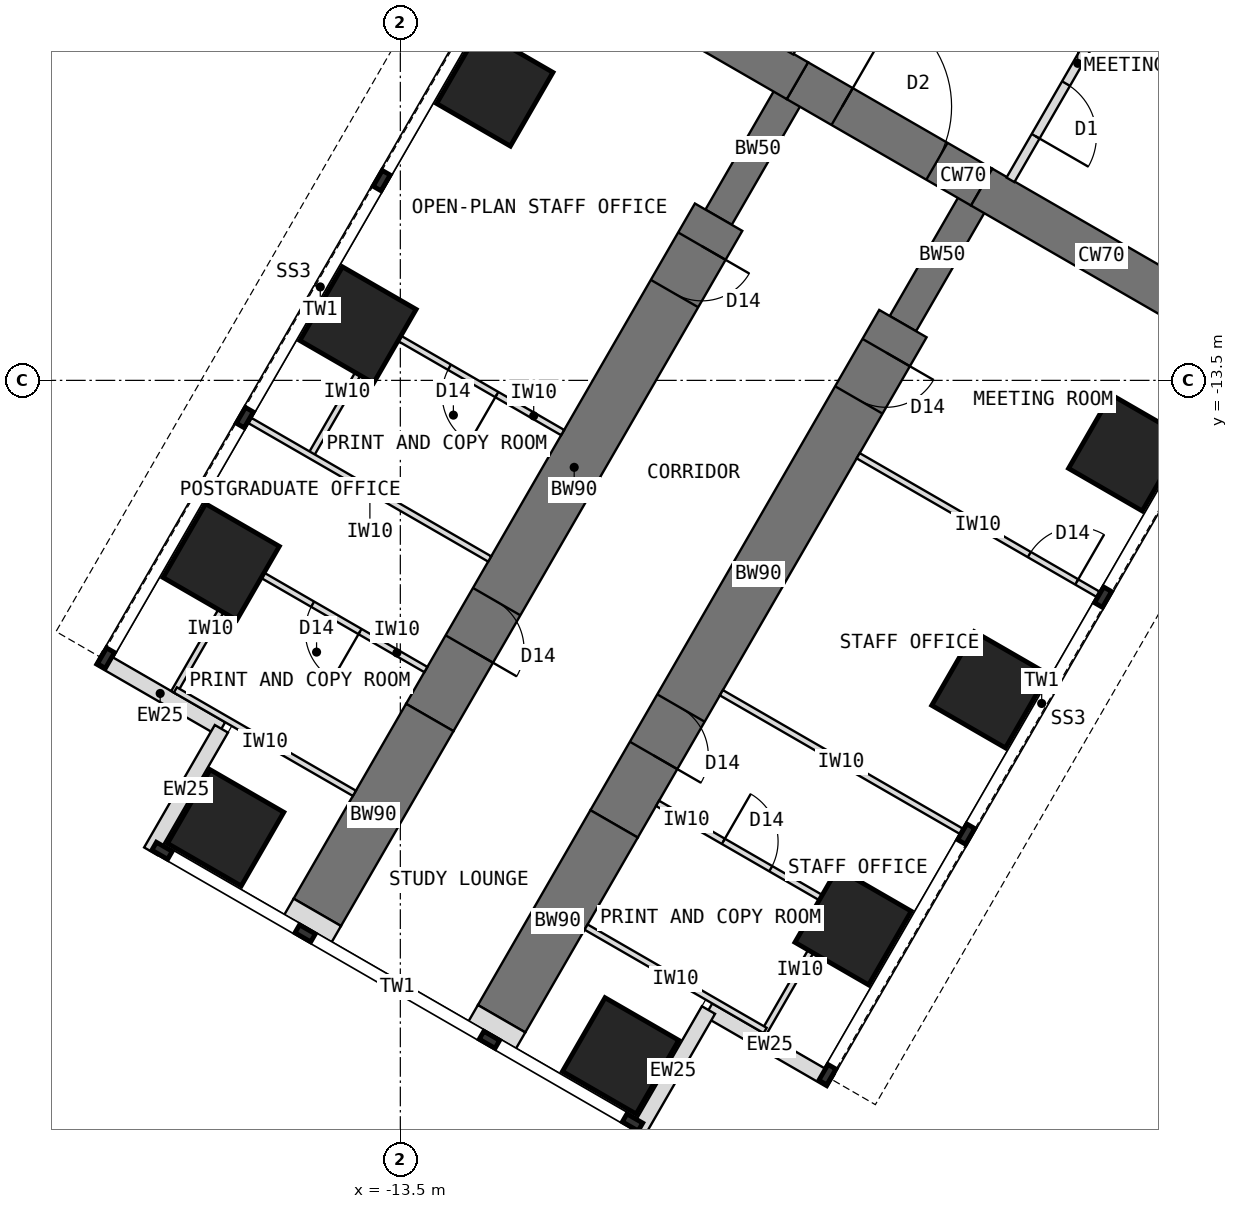
"""IFC4 building model, lengths in metres.
Left out: names, types, materials, properties, quantities, classifications, styles, units other than length and angle.
Written with IfcOpenShell. Run it as: python <this file> out.ifc"""

import sys

from ifc_helpers import new_model, si_unit, direction, frame, frame_2d, origin, origin_2d, place, context, subcontext, project, spatial, rectangle, extrude, element, fill, save


model = new_model("IFC4")
c1 = context("Model", 3, precision=1e-05, world=origin(), true_north=direction((0.0, 1.0)))
c2 = subcontext(c1, "Body", "Model", "MODEL_VIEW")
j1 = project(units=[si_unit("LENGTHUNIT", "METRE"), si_unit("PLANEANGLEUNIT", "RADIAN")], contexts=[c1])
p1 = place(None, origin())
s1 = spatial("IfcSite", under=j1, at=p1, CompositionType="ELEMENT")
p2 = place(p1, origin())
s2 = spatial("IfcBuilding", under=s1, at=p2, CompositionType="ELEMENT")
p3 = place(p2, frame((0.0, 0.0, 88.5)))
s3 = spatial("IfcBuildingStorey", under=s2, at=p3, CompositionType="ELEMENT", Elevation=88.5)
p4 = place(p3, frame((-10.908, -6.298, 0.0), z_axis=(0.0, 0.0, 1.0), x_axis=(0.866034513004, -0.499984222037, 0.0)))
e1 = element("IfcWall", 1, at=p4, inside=s3, PredefinedType="SHEAR", context=c2, shape_type="SweptSolid", body=[
    extrude(rectangle(XDim=4.548, YDim=0.7, at=frame_2d((2.274, 0.0))), origin(), (0.0, 0.0, 1.0), 4.0),
])
p5 = place(p3, frame((-6.97, -8.572, 0.0), z_axis=(0.0, 0.0, 1.0), x_axis=(0.866019471182, -0.500010275428, 0.0)))
e2 = element("IfcWall", 2, at=p5, inside=s3, PredefinedType="SHEAR", context=c2, shape_type="SweptSolid", body=[
    extrude(rectangle(XDim=3.5, YDim=0.7, at=frame_2d((1.75, 0.0))), origin(), (0.0, 0.0, 1.0), 4.0),
])
p6 = place(p5, frame((0.85, 0.0, 0.0)))
e3 = element("IfcOpeningElement", 3, at=p6, cuts=e2, PredefinedType="OPENING", context=c2, shape_type="SweptSolid", body=[
    extrude(rectangle(XDim=1.8, YDim=2.1, at=frame_2d((0.9, 1.05))), frame((0.0, 0.36, 0.0), z_axis=(0.0, -1.0, 0.0), x_axis=(1.0, 0.0, 0.0)), (0.0, 0.0, 1.0), 0.72),
])
p7 = place(p3, frame((-3.939, -10.322, 0.0), z_axis=(0.0, 0.0, 1.0), x_axis=(0.866011268655, -0.500024481964, 0.0)))
e4 = element("IfcWall", 4, at=p7, inside=s3, PredefinedType="SHEAR", context=c2, shape_type="SweptSolid", body=[
    extrude(rectangle(XDim=4.548, YDim=0.7, at=frame_2d((2.274, 0.0))), origin(), (0.0, 0.0, 1.0), 4.0),
])
p8 = place(p3, frame((-3.939, -10.322, 0.0), z_axis=(0.0, 0.0, 1.0), x_axis=(-0.499918158782, -0.866072649678, 0.0)))
e5 = element("IfcWall", 5, at=p8, inside=s3, PredefinedType="SHEAR", context=c2, shape_type="SweptSolid", body=[
    extrude(rectangle(XDim=2.592, YDim=0.5, at=frame_2d((1.296, 0.0))), origin(), (0.0, 0.0, 1.0), 4.0),
])
p9 = place(p3, frame((-5.234, -12.566, 0.0), z_axis=(0.0, 0.0, 1.0), x_axis=(-0.499997557548, -0.86602681393, 0.0)))
e6 = element("IfcWall", 6, at=p9, inside=s3, PredefinedType="SHEAR", context=c2, shape_type="SweptSolid", body=[
    extrude(rectangle(XDim=9.5, YDim=0.9, at=frame_2d((4.75, 0.0))), origin(), (0.0, 0.0, 1.0), 4.0),
])
p10 = place(p9, frame((0.55, 0.0, 0.0)))
e7 = element("IfcOpeningElement", 7, at=p10, cuts=e6, PredefinedType="OPENING", context=c2, shape_type="SweptSolid", body=[
    extrude(rectangle(XDim=0.9, YDim=2.1, at=frame_2d((0.45, 1.05))), frame((0.0, 0.46, 0.0), z_axis=(0.0, -1.0, 0.0), x_axis=(1.0, 0.0, 0.0)), (0.0, 0.0, 1.0), 0.92),
])
p11 = place(p9, frame((7.3, 0.0, 0.0)))
e8 = element("IfcOpeningElement", 8, at=p11, cuts=e6, PredefinedType="OPENING", context=c2, shape_type="SweptSolid", body=[
    extrude(rectangle(XDim=0.9, YDim=2.1, at=frame_2d((0.45, 1.05))), frame((0.0, 0.46, 0.0), z_axis=(0.0, -1.0, 0.0), x_axis=(1.0, 0.0, 0.0)), (0.0, 0.0, 1.0), 0.92),
])
p12 = place(p3, frame((-9.984, -20.794, 0.0), z_axis=(0.0, 0.0, 1.0), x_axis=(-0.500042316284, -0.866000971088, 0.0)))
e9 = element("IfcWall", 9, at=p12, inside=s3, PredefinedType="SHEAR", context=c2, shape_type="SweptSolid", body=[
    extrude(rectangle(XDim=3.7, YDim=0.9, at=frame_2d((1.85, 0.0))), origin(), (0.0, 0.0, 1.0), 4.0),
])
p13 = place(p3, frame((-6.97, -8.572, 0.0), z_axis=(0.0, 0.0, 1.0), x_axis=(-0.499988811324, -0.866031863473, 0.0)))
e10 = element("IfcWall", 10, at=p13, inside=s3, PredefinedType="SHEAR", context=c2, shape_type="SweptSolid", body=[
    extrude(rectangle(XDim=2.592, YDim=0.5, at=frame_2d((1.296, 0.0))), origin(), (0.0, 0.0, 1.0), 4.0),
])
p14 = place(p3, frame((-8.266, -10.816, 0.0), z_axis=(0.0, 0.0, 1.0), x_axis=(-0.499997557548, -0.86602681393, 0.0)))
e11 = element("IfcWall", 11, at=p14, inside=s3, PredefinedType="SHEAR", context=c2, shape_type="SweptSolid", body=[
    extrude(rectangle(XDim=9.5, YDim=0.9, at=frame_2d((4.75, 0.0))), origin(), (0.0, 0.0, 1.0), 4.0),
])
p15 = place(p14, frame((0.55, 0.0, 0.0)))
e12 = element("IfcOpeningElement", 12, at=p15, cuts=e11, PredefinedType="OPENING", context=c2, shape_type="SweptSolid", body=[
    extrude(rectangle(XDim=0.9, YDim=2.1, at=frame_2d((0.45, 1.05))), frame((0.0, 0.46, 0.0), z_axis=(0.0, -1.0, 0.0), x_axis=(1.0, 0.0, 0.0)), (0.0, 0.0, 1.0), 0.92),
])
p16 = place(p14, frame((7.3, 0.0, 0.0)))
e13 = element("IfcOpeningElement", 13, at=p16, cuts=e11, PredefinedType="OPENING", context=c2, shape_type="SweptSolid", body=[
    extrude(rectangle(XDim=0.9, YDim=2.1, at=frame_2d((0.45, 1.05))), frame((0.0, 0.46, 0.0), z_axis=(0.0, -1.0, 0.0), x_axis=(1.0, 0.0, 0.0)), (0.0, 0.0, 1.0), 0.92),
])
p17 = place(p3, frame((-13.016, -19.044, 0.0), z_axis=(0.0, 0.0, 1.0), x_axis=(-0.499992827086, -0.866029545028, 0.0)))
e14 = element("IfcWall", 14, at=p17, inside=s3, PredefinedType="SHEAR", context=c2, shape_type="SweptSolid", body=[
    extrude(rectangle(XDim=3.7, YDim=0.9, at=frame_2d((1.85, 0.0))), origin(), (0.0, 0.0, 1.0), 4.0),
])
for number, where, z_axis, x_axis in (
    (15, (-1.554, -14.691, 0.0), (0.0, 0.0, 1.0), (0.5, 0.866, 0.0)),
    (16, (-11.946, -8.691, 0.0), (0.0, 0.0, 1.0), (0.5, 0.866, 0.0)),
    (17, (-3.804, -18.588, 0.0), (0.0, 0.0, 1.0), (0.5, 0.866, 0.0)),
    (18, (-14.196, -12.588, 0.0), (0.0, 0.0, 1.0), (0.5, 0.866, 0.0)),
    (19, (-6.054, -22.486, 0.0), (0.0, 0.0, 1.0), (0.5, 0.866, 0.0)),
    (20, (-16.446, -16.486, 0.0), (0.0, 0.0, 1.0), (0.5, 0.866, 0.0)),
    (21, (-9.877, -24.608, 0.0), (0.0, 0.0, 1.0), (0.5, 0.866, 0.0)),
    (22, (-16.373, -20.858, 0.0), (0.0, 0.0, 1.0), (0.5, 0.866, 0.0)),
):
    element("IfcColumn", number, at=place(p3, frame(where, z_axis=z_axis, x_axis=x_axis)), inside=s3, PredefinedType="COLUMN", context=c2, shape_type="SweptSolid", body=[
        extrude(rectangle(XDim=1.4, YDim=1.4, at=origin_2d()), origin(), (0.0, 0.0, 1.0), 4.0),
    ])
for number, where, z_axis, x_axis in (
    (23, (-6.419, -25.017, 0.0), (0.0, 0.0, 1.0), (-0.866, 0.5, 0.0)),
    (24, (-8.432, -23.855, 0.0), (0.0, 0.0, 1.0), (-0.5, -0.866, 0.0)),
    (25, (-18.456, -18.067, 0.0), (0.0, 0.0, 1.0), (0.866, -0.5, 0.0)),
    (26, (-16.443, -19.23, 0.0), (0.0, 0.0, 1.0), (-0.5, -0.866, 0.0)),
):
    element("IfcWall", number, at=place(p3, frame(where, z_axis=z_axis, x_axis=x_axis)), inside=s3, PredefinedType="STANDARD", context=c2, shape_type="SweptSolid", body=[
        extrude(rectangle(XDim=2.325, YDim=0.25, at=frame_2d((1.163, 0.0))), origin(), (0.0, 0.0, 1.0), 3.7),
    ])
for number, where, z_axis, x_axis in (
    (27, (-11.834, -23.998, 0.0), (0.0, 0.0, 1.0), (-0.5, -0.866, 0.0)),
    (28, (-14.865, -22.248, 0.0), (0.0, 0.0, 1.0), (-0.5, -0.866, 0.0)),
):
    element("IfcWall", number, at=place(p3, frame(where, z_axis=z_axis, x_axis=x_axis)), inside=s3, PredefinedType="PARTITIONING", context=c2, shape_type="SweptSolid", body=[
        extrude(rectangle(XDim=0.31, YDim=0.9, at=frame_2d((0.155, 0.0))), origin(), (0.0, 0.0, 1.0), 3.7),
    ])
p18 = place(p3, frame((-1.201, -6.12, 0.0), z_axis=(0.0, 0.0, 1.0), x_axis=(0.500002627198, -0.866023886965, 0.0)))
e29 = element("IfcWall", 29, at=p18, inside=s3, PredefinedType="SHEAR", context=c2, shape_type="SweptSolid", body=[
    extrude(rectangle(XDim=5.858, YDim=0.4, at=frame_2d((2.929, 0.0))), origin(), (0.0, 0.0, 1.0), 4.0),
])
p19 = place(p3, frame((-5.97, -14.74, 0.0), z_axis=(0.0, 0.0, 1.0), x_axis=(0.866035472144, -0.499982560684, 0.0)))
e30 = element("IfcWall", 30, at=p19, inside=s3, PredefinedType="PARTITIONING", context=c2, shape_type="SweptSolid", body=[
    extrude(rectangle(XDim=4.55, YDim=0.1, at=frame_2d((2.275, 0.0))), origin(), (0.0, 0.0, 1.0), 3.7),
])
p20 = place(p19, frame((3.25, 0.0, 0.0)))
e31 = element("IfcOpeningElement", 31, at=p20, cuts=e30, PredefinedType="OPENING", context=c2, shape_type="SweptSolid", body=[
    extrude(rectangle(XDim=0.9, YDim=2.1, at=frame_2d((0.45, 1.05))), frame((0.0, 0.06, 0.0), z_axis=(0.0, -1.0, 0.0), x_axis=(1.0, 0.0, 0.0)), (0.0, 0.0, 1.0), 0.12),
])
p21 = place(p3, frame((-8.22, -18.637, 0.0), z_axis=(0.0, 0.0, 1.0), x_axis=(0.866012237902, -0.500022803284, 0.0)))
e32 = element("IfcWall", 32, at=p21, inside=s3, PredefinedType="PARTITIONING", context=c2, shape_type="SweptSolid", body=[
    extrude(rectangle(XDim=4.55, YDim=0.1, at=frame_2d((2.275, 0.0))), origin(), (0.0, 0.0, 1.0), 3.7),
])
p22 = place(p3, frame((-6.325, -22.156, 0.0), z_axis=(0.0, 0.0, 1.0), x_axis=(-0.500001309137, -0.866024647952, 0.0)))
e33 = element("IfcWall", 33, at=p22, inside=s3, PredefinedType="PARTITIONING", context=c2, shape_type="SweptSolid", body=[
    extrude(rectangle(XDim=2.4, YDim=0.1, at=frame_2d((1.2, 0.0))), origin(), (0.0, 0.0, 1.0), 3.7),
])
p23 = place(p3, frame((-9.27, -20.456, 0.0), z_axis=(0.0, 0.0, 1.0), x_axis=(0.866007419912, -0.500031147688, 0.0)))
e34 = element("IfcWall", 34, at=p23, inside=s3, PredefinedType="PARTITIONING", context=c2, shape_type="SweptSolid", body=[
    extrude(rectangle(XDim=3.4, YDim=0.1, at=frame_2d((1.7, 0.0))), origin(), (0.0, 0.0, 1.0), 3.7),
])
p24 = place(p23, frame((1.25, 0.0, 0.0)))
e35 = element("IfcOpeningElement", 35, at=p24, cuts=e34, PredefinedType="OPENING", context=c2, shape_type="SweptSolid", body=[
    extrude(rectangle(XDim=0.9, YDim=2.1, at=frame_2d((0.45, 1.05))), frame((0.0, 0.06, 0.0), z_axis=(0.0, -1.0, 0.0), x_axis=(1.0, 0.0, 0.0)), (0.0, 0.0, 1.0), 0.12),
])
p25 = place(p3, frame((-10.445, -22.491, 0.0), z_axis=(0.0, 0.0, 1.0), x_axis=(0.866007419912, -0.500031147688, 0.0)))
e36 = element("IfcWall", 36, at=p25, inside=s3, PredefinedType="PARTITIONING", context=c2, shape_type="SweptSolid", body=[
    extrude(rectangle(XDim=3.4, YDim=0.1, at=frame_2d((1.7, 0.0))), origin(), (0.0, 0.0, 1.0), 3.7),
])
p26 = place(p3, frame((-12.03, -16.437, 0.0), z_axis=(0.0, 0.0, 1.0), x_axis=(-0.866035472144, 0.499982560684, 0.0)))
e37 = element("IfcWall", 37, at=p26, inside=s3, PredefinedType="PARTITIONING", context=c2, shape_type="SweptSolid", body=[
    extrude(rectangle(XDim=4.55, YDim=0.1, at=frame_2d((2.275, 0.0))), origin(), (0.0, 0.0, 1.0), 3.7),
])
p27 = place(p3, frame((-13.775, -12.658, 0.0), z_axis=(0.0, 0.0, 1.0), x_axis=(-0.500033551112, -0.866006032174, 0.0)))
e38 = element("IfcWall", 38, at=p27, inside=s3, PredefinedType="PARTITIONING", context=c2, shape_type="SweptSolid", body=[
    extrude(rectangle(XDim=2.4, YDim=0.1, at=frame_2d((1.2, 0.0))), origin(), (0.0, 0.0, 1.0), 3.7),
])
p28 = place(p3, frame((-10.83, -14.359, 0.0), z_axis=(0.0, 0.0, 1.0), x_axis=(-0.865989465428, 0.500062241894, 0.0)))
e39 = element("IfcWall", 39, at=p28, inside=s3, PredefinedType="PARTITIONING", context=c2, shape_type="SweptSolid", body=[
    extrude(rectangle(XDim=3.4, YDim=0.1, at=frame_2d((1.7, 0.0))), origin(), (0.0, 0.0, 1.0), 3.7),
])
p29 = place(p28, frame((1.25, 0.0, 0.0)))
e40 = element("IfcOpeningElement", 40, at=p29, cuts=e39, PredefinedType="OPENING", context=c2, shape_type="SweptSolid", body=[
    extrude(rectangle(XDim=0.9, YDim=2.1, at=frame_2d((0.45, 1.05))), frame((0.0, 0.06, 0.0), z_axis=(0.0, -1.0, 0.0), x_axis=(1.0, 0.0, 0.0)), (0.0, 0.0, 1.0), 0.12),
])
p30 = place(p3, frame((-16.025, -16.556, 0.0), z_axis=(0.0, 0.0, 1.0), x_axis=(-0.500077600433, -0.865980596518, 0.0)))
e41 = element("IfcWall", 41, at=p30, inside=s3, PredefinedType="PARTITIONING", context=c2, shape_type="SweptSolid", body=[
    extrude(rectangle(XDim=2.4, YDim=0.1, at=frame_2d((1.2, 0.0))), origin(), (0.0, 0.0, 1.0), 3.7),
])
p31 = place(p3, frame((-13.08, -18.256, 0.0), z_axis=(0.0, 0.0, 1.0), x_axis=(-0.866020560687, 0.500008388397, 0.0)))
e42 = element("IfcWall", 42, at=p31, inside=s3, PredefinedType="PARTITIONING", context=c2, shape_type="SweptSolid", body=[
    extrude(rectangle(XDim=3.4, YDim=0.1, at=frame_2d((1.7, 0.0))), origin(), (0.0, 0.0, 1.0), 3.7),
])
p32 = place(p31, frame((1.25, 0.0, 0.0)))
e43 = element("IfcOpeningElement", 43, at=p32, cuts=e42, PredefinedType="OPENING", context=c2, shape_type="SweptSolid", body=[
    extrude(rectangle(XDim=0.9, YDim=2.1, at=frame_2d((0.45, 1.05))), frame((0.0, 0.06, 0.0), z_axis=(0.0, -1.0, 0.0), x_axis=(1.0, 0.0, 0.0)), (0.0, 0.0, 1.0), 0.12),
])
p33 = place(p3, frame((-14.255, -20.291, 0.0), z_axis=(0.0, 0.0, 1.0), x_axis=(-0.866020560687, 0.500008388397, 0.0)))
e44 = element("IfcWall", 44, at=p33, inside=s3, PredefinedType="PARTITIONING", context=c2, shape_type="SweptSolid", body=[
    extrude(rectangle(XDim=3.4, YDim=0.1, at=frame_2d((1.7, 0.0))), origin(), (0.0, 0.0, 1.0), 3.7),
])
p34 = place(p3, frame((-1.253, -6.37, 0.0), z_axis=(0.0, 0.0, 1.0), x_axis=(-0.500007369519, -0.866021148949, 0.0)))
e45 = element("IfcWall", 45, at=p34, inside=s3, PredefinedType="PARTITIONING", context=c2, shape_type="SweptSolid", body=[
    extrude(rectangle(XDim=4.426, YDim=0.15, at=frame_2d((2.213, 0.0))), origin(), (0.0, 0.0, 1.0), 3.7),
])
p35 = place(p34, frame((2.598, 0.0, 0.0)))
e46 = element("IfcOpeningElement", 46, at=p35, cuts=e45, PredefinedType="OPENING", context=c2, shape_type="SweptSolid", body=[
    extrude(rectangle(XDim=1.0, YDim=2.1, at=frame_2d((0.5, 1.05))), frame((0.0, 0.085, 0.0), z_axis=(0.0, -1.0, 0.0), x_axis=(1.0, 0.0, 0.0)), (0.0, 0.0, 1.0), 0.17),
])
p36 = place(p3, frame((-7.103, -8.103, 0.0), z_axis=(0.0, 0.0, 1.0), x_axis=(0.500007369519, 0.866021148949, 0.0)))
e47 = element("IfcWall", 47, at=p36, inside=s3, PredefinedType="PARTITIONING", context=c2, shape_type="SweptSolid", body=[
    extrude(rectangle(XDim=4.426, YDim=0.15, at=frame_2d((2.213, 0.0))), origin(), (0.0, 0.0, 1.0), 3.7),
])
p37 = place(p36, frame((0.828, 0.0, 0.0)))
e48 = element("IfcOpeningElement", 48, at=p37, cuts=e47, PredefinedType="OPENING", context=c2, shape_type="SweptSolid", body=[
    extrude(rectangle(XDim=1.0, YDim=2.1, at=frame_2d((0.5, 1.05))), frame((0.0, 0.085, 0.0), z_axis=(0.0, -1.0, 0.0), x_axis=(1.0, 0.0, 0.0)), (0.0, 0.0, 1.0), 0.17),
])
p38 = place(p6, origin())
e49 = element("IfcDoor", 49, at=p38, inside=s3, OperationType="DOUBLE_DOOR_DOUBLE_SWING", PredefinedType="DOOR", context=c2, shape_type="SweptSolid", body=[
    extrude(rectangle(XDim=1.72, YDim=2.06, at=frame_2d((0.9, 1.03))), frame((0.0, 0.025, 0.0), z_axis=(0.0, -1.0, 0.0), x_axis=(1.0, 0.0, 0.0)), (0.0, 0.0, 1.0), 0.05),
    extrude(rectangle(XDim=0.04, YDim=2.1, at=frame_2d((0.02, 1.05))), frame((0.0, 0.35, 0.0), z_axis=(0.0, -1.0, 0.0), x_axis=(1.0, 0.0, 0.0)), (0.0, 0.0, 1.0), 0.699),
    extrude(rectangle(XDim=0.04, YDim=2.1, at=frame_2d((1.78, 1.05))), frame((0.0, 0.35, 0.0), z_axis=(0.0, -1.0, 0.0), x_axis=(1.0, 0.0, 0.0)), (0.0, 0.0, 1.0), 0.699),
    extrude(rectangle(XDim=1.72, YDim=0.04, at=frame_2d((0.9, 2.08))), frame((0.0, 0.35, 0.0), z_axis=(0.0, -1.0, 0.0), x_axis=(1.0, 0.0, 0.0)), (0.0, 0.0, 1.0), 0.699),
])
fill(e3, e49)
p39 = place(p20, origin())
e50 = element("IfcDoor", 50, at=p39, inside=s3, OperationType="SINGLE_SWING_RIGHT", PredefinedType="DOOR", context=c2, shape_type="SweptSolid", body=[
    extrude(rectangle(XDim=0.9, YDim=2.1, at=frame_2d((0.45, 1.05))), frame((0.0, 0.025, 0.0), z_axis=(0.0, -1.0, 0.0), x_axis=(1.0, 0.0, 0.0)), (0.0, 0.0, 1.0), 0.05),
])
fill(e31, e50)
p40 = place(p24, origin())
e51 = element("IfcDoor", 51, at=p40, inside=s3, OperationType="SINGLE_SWING_LEFT", PredefinedType="DOOR", context=c2, shape_type="SweptSolid", body=[
    extrude(rectangle(XDim=0.9, YDim=2.1, at=frame_2d((0.45, 1.05))), frame((0.0, 0.025, 0.0), z_axis=(0.0, -1.0, 0.0), x_axis=(1.0, 0.0, 0.0)), (0.0, 0.0, 1.0), 0.05),
])
fill(e35, e51)
p41 = place(p29, origin())
e52 = element("IfcDoor", 52, at=p41, inside=s3, OperationType="SINGLE_SWING_LEFT", PredefinedType="DOOR", context=c2, shape_type="SweptSolid", body=[
    extrude(rectangle(XDim=0.9, YDim=2.1, at=frame_2d((0.45, 1.05))), frame((0.0, 0.025, 0.0), z_axis=(0.0, -1.0, 0.0), x_axis=(1.0, 0.0, 0.0)), (0.0, 0.0, 1.0), 0.05),
])
fill(e40, e52)
p42 = place(p32, origin())
e53 = element("IfcDoor", 53, at=p42, inside=s3, OperationType="SINGLE_SWING_LEFT", PredefinedType="DOOR", context=c2, shape_type="SweptSolid", body=[
    extrude(rectangle(XDim=0.9, YDim=2.1, at=frame_2d((0.45, 1.05))), frame((0.0, 0.025, 0.0), z_axis=(0.0, -1.0, 0.0), x_axis=(1.0, 0.0, 0.0)), (0.0, 0.0, 1.0), 0.05),
])
fill(e43, e53)
p43 = place(p35, origin())
e54 = element("IfcDoor", 54, at=p43, inside=s3, OperationType="SINGLE_SWING_RIGHT", PredefinedType="DOOR", context=c2, shape_type="SweptSolid", body=[
    extrude(rectangle(XDim=1.0, YDim=2.1, at=frame_2d((0.5, 1.05))), frame((0.0, 0.025, 0.0), z_axis=(0.0, -1.0, 0.0), x_axis=(1.0, 0.0, 0.0)), (0.0, 0.0, 1.0), 0.05),
])
fill(e46, e54)
p44 = place(p10, origin())
e55 = element("IfcDoor", 55, at=p44, inside=s3, OperationType="SINGLE_SWING_LEFT", PredefinedType="DOOR", context=c2, shape_type="SweptSolid", body=[
    extrude(rectangle(XDim=0.82, YDim=2.06, at=frame_2d((0.45, 1.03))), frame((0.0, 0.025, 0.0), z_axis=(0.0, -1.0, 0.0), x_axis=(1.0, 0.0, 0.0)), (0.0, 0.0, 1.0), 0.05),
    extrude(rectangle(XDim=0.04, YDim=2.1, at=frame_2d((0.02, 1.05))), frame((0.0, 0.45, 0.0), z_axis=(0.0, -1.0, 0.0), x_axis=(1.0, 0.0, 0.0)), (0.0, 0.0, 1.0), 0.899),
    extrude(rectangle(XDim=0.04, YDim=2.1, at=frame_2d((0.88, 1.05))), frame((0.0, 0.45, 0.0), z_axis=(0.0, -1.0, 0.0), x_axis=(1.0, 0.0, 0.0)), (0.0, 0.0, 1.0), 0.899),
    extrude(rectangle(XDim=0.82, YDim=0.04, at=frame_2d((0.45, 2.08))), frame((0.0, 0.45, 0.0), z_axis=(0.0, -1.0, 0.0), x_axis=(1.0, 0.0, 0.0)), (0.0, 0.0, 1.0), 0.899),
])
fill(e7, e55)
p45 = place(p11, origin())
e56 = element("IfcDoor", 56, at=p45, inside=s3, OperationType="SINGLE_SWING_RIGHT", PredefinedType="DOOR", context=c2, shape_type="SweptSolid", body=[
    extrude(rectangle(XDim=0.82, YDim=2.06, at=frame_2d((0.45, 1.03))), frame((0.0, 0.025, 0.0), z_axis=(0.0, -1.0, 0.0), x_axis=(1.0, 0.0, 0.0)), (0.0, 0.0, 1.0), 0.05),
    extrude(rectangle(XDim=0.04, YDim=2.1, at=frame_2d((0.02, 1.05))), frame((0.0, 0.45, 0.0), z_axis=(0.0, -1.0, 0.0), x_axis=(1.0, 0.0, 0.0)), (0.0, 0.0, 1.0), 0.899),
    extrude(rectangle(XDim=0.04, YDim=2.1, at=frame_2d((0.88, 1.05))), frame((0.0, 0.45, 0.0), z_axis=(0.0, -1.0, 0.0), x_axis=(1.0, 0.0, 0.0)), (0.0, 0.0, 1.0), 0.899),
    extrude(rectangle(XDim=0.82, YDim=0.04, at=frame_2d((0.45, 2.08))), frame((0.0, 0.45, 0.0), z_axis=(0.0, -1.0, 0.0), x_axis=(1.0, 0.0, 0.0)), (0.0, 0.0, 1.0), 0.899),
])
fill(e8, e56)
p46 = place(p15, origin())
e57 = element("IfcDoor", 57, at=p46, inside=s3, OperationType="SINGLE_SWING_LEFT", PredefinedType="DOOR", context=c2, shape_type="SweptSolid", body=[
    extrude(rectangle(XDim=0.82, YDim=2.06, at=frame_2d((0.45, 1.03))), frame((0.0, 0.025, 0.0), z_axis=(0.0, -1.0, 0.0), x_axis=(1.0, 0.0, 0.0)), (0.0, 0.0, 1.0), 0.05),
    extrude(rectangle(XDim=0.04, YDim=2.1, at=frame_2d((0.02, 1.05))), frame((0.0, 0.45, 0.0), z_axis=(0.0, -1.0, 0.0), x_axis=(1.0, 0.0, 0.0)), (0.0, 0.0, 1.0), 0.899),
    extrude(rectangle(XDim=0.04, YDim=2.1, at=frame_2d((0.88, 1.05))), frame((0.0, 0.45, 0.0), z_axis=(0.0, -1.0, 0.0), x_axis=(1.0, 0.0, 0.0)), (0.0, 0.0, 1.0), 0.899),
    extrude(rectangle(XDim=0.82, YDim=0.04, at=frame_2d((0.45, 2.08))), frame((0.0, 0.45, 0.0), z_axis=(0.0, -1.0, 0.0), x_axis=(1.0, 0.0, 0.0)), (0.0, 0.0, 1.0), 0.899),
])
fill(e12, e57)
p47 = place(p16, origin())
e58 = element("IfcDoor", 58, at=p47, inside=s3, OperationType="SINGLE_SWING_RIGHT", PredefinedType="DOOR", context=c2, shape_type="SweptSolid", body=[
    extrude(rectangle(XDim=0.82, YDim=2.06, at=frame_2d((0.45, 1.03))), frame((0.0, 0.025, 0.0), z_axis=(0.0, -1.0, 0.0), x_axis=(1.0, 0.0, 0.0)), (0.0, 0.0, 1.0), 0.05),
    extrude(rectangle(XDim=0.04, YDim=2.1, at=frame_2d((0.02, 1.05))), frame((0.0, 0.45, 0.0), z_axis=(0.0, -1.0, 0.0), x_axis=(1.0, 0.0, 0.0)), (0.0, 0.0, 1.0), 0.899),
    extrude(rectangle(XDim=0.04, YDim=2.1, at=frame_2d((0.88, 1.05))), frame((0.0, 0.45, 0.0), z_axis=(0.0, -1.0, 0.0), x_axis=(1.0, 0.0, 0.0)), (0.0, 0.0, 1.0), 0.899),
    extrude(rectangle(XDim=0.82, YDim=0.04, at=frame_2d((0.45, 2.08))), frame((0.0, 0.45, 0.0), z_axis=(0.0, -1.0, 0.0), x_axis=(1.0, 0.0, 0.0)), (0.0, 0.0, 1.0), 0.899),
])
fill(e13, e58)
save(model, sys.argv[1])
